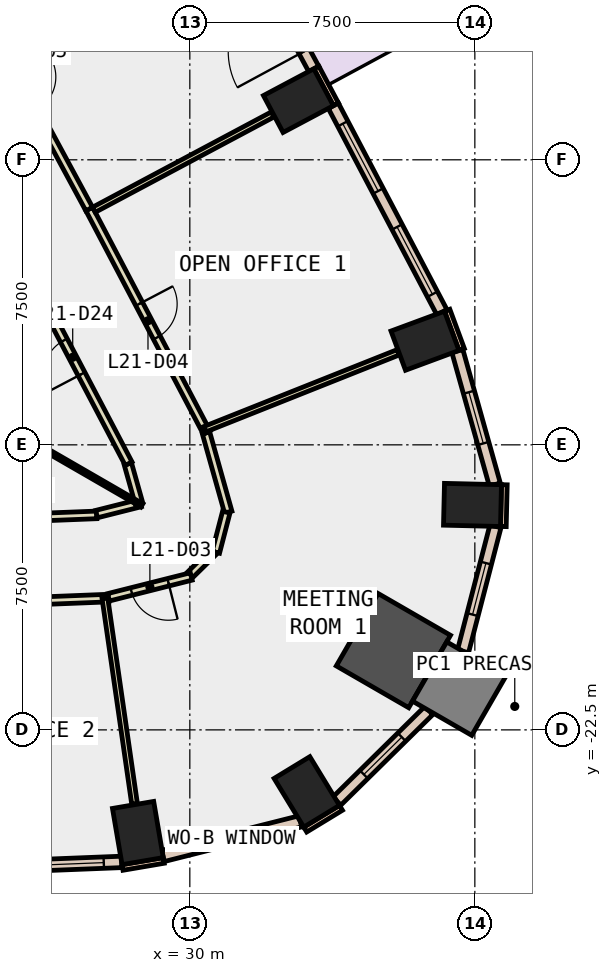
"""IFC4 building model, lengths in metres.
Left out: names, types, materials, properties, quantities, classifications, styles, units other than length and angle.
Written with IfcOpenShell. Run it as: python <this file> out.ifc"""

import sys

from ifc_helpers import new_model, si_unit, direction, frame, frame_2d, origin, origin_2d, place, context, subcontext, project, spatial, rectangle, extrude, element, fill, save


model = new_model("IFC4")
c1 = context("Model", 3, precision=1e-05, world=origin(), true_north=direction((0.0, 1.0)))
c2 = subcontext(c1, "Body", "Model", "MODEL_VIEW")
j1 = project(units=[si_unit("LENGTHUNIT", "METRE"), si_unit("PLANEANGLEUNIT", "RADIAN")], contexts=[c1])
p1 = place(None, origin())
s1 = spatial("IfcSite", under=j1, at=p1, CompositionType="ELEMENT")
p2 = place(p1, origin())
s2 = spatial("IfcBuilding", under=s1, at=p2, CompositionType="ELEMENT")
p3 = place(p2, frame((0.0, 0.0, 99.2)))
s3 = spatial("IfcBuildingStorey", under=s2, at=p3, CompositionType="ELEMENT", Elevation=99.2)
for number, where, z_axis, x_axis in (
    (1, (28.633, -25.214, -0.4), (0.0, 0.0, 1.0), (0.986, 0.168, 0.0)),
    (2, (33.078, -24.132, -0.4), (0.0, 0.0, 1.0), (0.854, 0.52, 0.0)),
):
    element("IfcColumn", number, at=place(p3, frame(where, z_axis=z_axis, x_axis=x_axis)), inside=s3, PredefinedType="COLUMN", context=c2, shape_type="SweptSolid", body=[
        extrude(rectangle(XDim=1.1, YDim=1.5, at=origin_2d()), origin(), (0.0, 0.0, 1.0), 4.2),
    ])
p4 = place(p3, frame((35.357, -20.414, -0.4), z_axis=(0.0, 0.0, 1.0), x_axis=(-0.866025403784, 0.5, 0.0)))
e3 = element("IfcColumn", 3, at=p4, inside=s3, PredefinedType="COLUMN", context=c2, shape_type="SweptSolid", body=[
    extrude(rectangle(XDim=2.2, YDim=2.2, at=origin_2d()), origin(), (0.0, 0.0, 1.0), 4.2),
])
for number, where, z_axis, x_axis in (
    (4, (37.438, -16.581, -0.4), (0.0, 0.0, 1.0), (0.023, 1.0, 0.0)),
    (5, (36.188, -12.261, -0.4), (0.0, 0.0, 1.0), (-0.347, 0.938, 0.0)),
    (6, (32.858, -5.943, -0.4), (0.0, 0.0, 1.0), (-0.469, 0.883, 0.0)),
):
    element("IfcColumn", number, at=place(p3, frame(where, z_axis=z_axis, x_axis=x_axis)), inside=s3, PredefinedType="COLUMN", context=c2, shape_type="SweptSolid", body=[
        extrude(rectangle(XDim=1.1, YDim=1.5, at=origin_2d()), origin(), (0.0, 0.0, 1.0), 4.2),
    ])
p5 = place(p3, frame((37.089, -21.414, -0.4), z_axis=(0.0, 0.0, 1.0), x_axis=(-0.866025403784, 0.5, 0.0)))
e7 = element("IfcColumn", 7, at=p5, inside=s3, PredefinedType="COLUMN", context=c2, shape_type="SweptSolid", body=[
    extrude(rectangle(XDim=1.8, YDim=1.8, at=origin_2d()), origin(), (0.0, 0.0, 1.0), 4.2),
])
p6 = place(p3, frame((37.153, -12.49, 0.0), z_axis=(0.0, 0.0, 1.0), x_axis=(-0.347205967468, 0.937788897436, 0.0)))
e8 = element("IfcWall", 8, at=p6, inside=s3, PredefinedType="STANDARD", context=c2, shape_type="SweptSolid", body=[
    extrude(rectangle(XDim=1.1, YDim=0.15, at=frame_2d((0.55, 0.0))), origin(), (0.0, 0.0, 1.0), 3.8),
])
p7 = place(p3, frame((33.845, -6.042, 0.0), z_axis=(0.0, 0.0, 1.0), x_axis=(-0.46919310775, 0.883095593716, 0.0)))
e9 = element("IfcWall", 9, at=p7, inside=s3, PredefinedType="STANDARD", context=c2, shape_type="SweptSolid", body=[
    extrude(rectangle(XDim=1.099, YDim=0.15, at=frame_2d((0.55, 0.0))), origin(), (0.0, 0.0, 1.0), 3.8),
])
p8 = place(p3, frame((28.229, -26.12, 0.0), z_axis=(0.0, 0.0, 1.0), x_axis=(0.985763338892, 0.168138751323, 0.0)))
e10 = element("IfcWall", 10, at=p8, inside=s3, PredefinedType="STANDARD", context=c2, shape_type="SweptSolid", body=[
    extrude(rectangle(XDim=1.101, YDim=0.15, at=frame_2d((0.55, 0.0))), origin(), (0.0, 0.0, 1.0), 3.8),
])
p9 = place(p3, frame((33.037, -25.123, 0.0), z_axis=(0.0, 0.0, 1.0), x_axis=(0.854245682901, 0.519869515594, 0.0)))
e11 = element("IfcWall", 11, at=p9, inside=s3, PredefinedType="STANDARD", context=c2, shape_type="SweptSolid", body=[
    extrude(rectangle(XDim=1.1, YDim=0.15, at=frame_2d((0.55, 0.0))), origin(), (0.0, 0.0, 1.0), 3.8),
])
p10 = place(p3, frame((38.25, -17.15, 0.0), z_axis=(0.0, 0.0, 1.0), x_axis=(0.023522901136, 0.999723298279, 0.0)))
e12 = element("IfcWall", 12, at=p10, inside=s3, PredefinedType="STANDARD", context=c2, shape_type="SweptSolid", body=[
    extrude(rectangle(XDim=1.1, YDim=0.15, at=frame_2d((0.55, 0.0))), origin(), (0.0, 0.0, 1.0), 3.8),
])
p11 = place(p3, frame((22.332, -26.206, 0.0), z_axis=(0.0, 0.0, 1.0), x_axis=(0.99922113396, 0.039460428885, 0.0)))
e13 = element("IfcWall", 13, at=p11, inside=s3, PredefinedType="STANDARD", context=c2, shape_type="SweptSolid", body=[
    extrude(rectangle(XDim=5.878, YDim=0.3, at=frame_2d((2.939, 0.0))), origin(), (0.0, 0.0, 1.0), 3.8),
])
p12 = place(p11, frame((0.469, 0.0, 0.9)))
e14 = element("IfcOpeningElement", 14, at=p12, cuts=e13, PredefinedType="OPENING", context=c2, shape_type="SweptSolid", body=[
    extrude(rectangle(XDim=2.0, YDim=2.6, at=frame_2d((1.0, 1.3))), frame((0.0, 0.16, 0.0), z_axis=(0.0, -1.0, 0.0), x_axis=(1.0, 0.0, 0.0)), (0.0, 0.0, 1.0), 0.32),
])
p13 = place(p11, frame((3.408, 0.0, 0.9)))
e15 = element("IfcOpeningElement", 15, at=p13, cuts=e13, PredefinedType="OPENING", context=c2, shape_type="SweptSolid", body=[
    extrude(rectangle(XDim=2.0, YDim=2.6, at=frame_2d((1.0, 1.3))), frame((0.0, 0.16, 0.0), z_axis=(0.0, -1.0, 0.0), x_axis=(1.0, 0.0, 0.0)), (0.0, 0.0, 1.0), 0.32),
])
p14 = place(p3, frame((29.293, -25.818, 0.0), z_axis=(0.0, 0.0, 1.0), x_axis=(0.969658938481, 0.244461741432, 0.0)))
e16 = element("IfcWall", 16, at=p14, inside=s3, PredefinedType="STANDARD", context=c2, shape_type="SweptSolid", body=[
    extrude(rectangle(XDim=3.727, YDim=0.3, at=frame_2d((1.864, 0.0))), origin(), (0.0, 0.0, 1.0), 3.8),
])
p15 = place(p14, frame((1.164, 0.0, 0.9)))
e17 = element("IfcOpeningElement", 17, at=p15, cuts=e16, PredefinedType="OPENING", context=c2, shape_type="SweptSolid", body=[
    extrude(rectangle(XDim=1.4, YDim=2.6, at=frame_2d((0.7, 1.3))), frame((0.0, 0.16, 0.0), z_axis=(0.0, -1.0, 0.0), x_axis=(1.0, 0.0, 0.0)), (0.0, 0.0, 1.0), 0.32),
])
p16 = place(p3, frame((33.868, -24.374, 0.0), z_axis=(0.0, 0.0, 1.0), x_axis=(0.712546371703, 0.701625019631, 0.0)))
e18 = element("IfcWall", 18, at=p16, inside=s3, PredefinedType="STANDARD", context=c2, shape_type="SweptSolid", body=[
    extrude(rectangle(XDim=3.398, YDim=0.3, at=frame_2d((1.699, 0.0))), origin(), (0.0, 0.0, 1.0), 3.8),
])
p17 = place(p16, frame((0.999, 0.0, 0.9)))
e19 = element("IfcOpeningElement", 19, at=p17, cuts=e18, PredefinedType="OPENING", context=c2, shape_type="SweptSolid", body=[
    extrude(rectangle(XDim=1.4, YDim=2.6, at=frame_2d((0.7, 1.3))), frame((0.0, 0.16, 0.0), z_axis=(0.0, -1.0, 0.0), x_axis=(1.0, 0.0, 0.0)), (0.0, 0.0, 1.0), 0.32),
])
p18 = place(p3, frame((37.189, -20.433, 0.0), z_axis=(0.0, 0.0, 1.0), x_axis=(0.251046938153, 0.967974914367, 0.0)))
e20 = element("IfcWall", 20, at=p18, inside=s3, PredefinedType="STANDARD", context=c2, shape_type="SweptSolid", body=[
    extrude(rectangle(XDim=3.398, YDim=0.3, at=frame_2d((1.699, 0.0))), origin(), (0.0, 0.0, 1.0), 3.8),
])
p19 = place(p18, frame((0.999, 0.0, 0.9)))
e21 = element("IfcOpeningElement", 21, at=p19, cuts=e20, PredefinedType="OPENING", context=c2, shape_type="SweptSolid", body=[
    extrude(rectangle(XDim=1.4, YDim=2.6, at=frame_2d((0.7, 1.3))), frame((0.0, 0.16, 0.0), z_axis=(0.0, -1.0, 0.0), x_axis=(1.0, 0.0, 0.0)), (0.0, 0.0, 1.0), 0.32),
])
p20 = place(p3, frame((38.026, -16.046, 0.0), z_axis=(0.0, 0.0, 1.0), x_axis=(-0.270054089595, 0.96284515302, 0.0)))
e22 = element("IfcWall", 22, at=p20, inside=s3, PredefinedType="STANDARD", context=c2, shape_type="SweptSolid", body=[
    extrude(rectangle(XDim=3.651, YDim=0.3, at=frame_2d((1.825, 0.0))), origin(), (0.0, 0.0, 1.0), 3.8),
])
p21 = place(p20, frame((1.125, 0.0, 0.9)))
e23 = element("IfcOpeningElement", 23, at=p21, cuts=e22, PredefinedType="OPENING", context=c2, shape_type="SweptSolid", body=[
    extrude(rectangle(XDim=1.4, YDim=2.6, at=frame_2d((0.7, 1.3))), frame((0.0, 0.16, 0.0), z_axis=(0.0, -1.0, 0.0), x_axis=(1.0, 0.0, 0.0)), (0.0, 0.0, 1.0), 0.32),
])
p22 = place(p3, frame((36.633, -11.511, 0.0), z_axis=(0.0, 0.0, 1.0), x_axis=(-0.465380908665, 0.88511050714, 0.0)))
e24 = element("IfcWall", 24, at=p22, inside=s3, PredefinedType="STANDARD", context=c2, shape_type="SweptSolid", body=[
    extrude(rectangle(XDim=6.139, YDim=0.3, at=frame_2d((3.07, 0.0))), origin(), (0.0, 0.0, 1.0), 3.8),
])
p23 = place(p22, frame((0.535, 0.0, 0.9)))
e25 = element("IfcOpeningElement", 25, at=p23, cuts=e24, PredefinedType="OPENING", context=c2, shape_type="SweptSolid", body=[
    extrude(rectangle(XDim=2.0, YDim=2.6, at=frame_2d((1.0, 1.3))), frame((0.0, 0.16, 0.0), z_axis=(0.0, -1.0, 0.0), x_axis=(1.0, 0.0, 0.0)), (0.0, 0.0, 1.0), 0.32),
])
p24 = place(p22, frame((3.604, 0.0, 0.9)))
e26 = element("IfcOpeningElement", 26, at=p24, cuts=e24, PredefinedType="OPENING", context=c2, shape_type="SweptSolid", body=[
    extrude(rectangle(XDim=2.0, YDim=2.6, at=frame_2d((1.0, 1.3))), frame((0.0, 0.16, 0.0), z_axis=(0.0, -1.0, 0.0), x_axis=(1.0, 0.0, 0.0)), (0.0, 0.0, 1.0), 0.32),
])
p25 = place(p3, frame((33.26, -5.108, 0.0), z_axis=(0.0, 0.0, 1.0), x_axis=(-0.475573079782, 0.879676216449, 0.0)))
e27 = element("IfcWall", 27, at=p25, inside=s3, PredefinedType="STANDARD", context=c2, shape_type="SweptSolid", body=[
    extrude(rectangle(XDim=6.104, YDim=0.3, at=frame_2d((3.052, 0.0))), origin(), (0.0, 0.0, 1.0), 3.8),
])
p26 = place(p25, frame((0.526, 0.0, 0.0)))
e28 = element("IfcOpeningElement", 28, at=p26, cuts=e27, PredefinedType="OPENING", context=c2, shape_type="SweptSolid", body=[
    extrude(rectangle(XDim=2.0, YDim=2.4, at=frame_2d((1.0, 1.2))), frame((0.0, 0.16, 0.0), z_axis=(0.0, -1.0, 0.0), x_axis=(1.0, 0.0, 0.0)), (0.0, 0.0, 1.0), 0.32),
])
p27 = place(p25, frame((3.578, 0.0, 0.9)))
e29 = element("IfcOpeningElement", 29, at=p27, cuts=e27, PredefinedType="OPENING", context=c2, shape_type="SweptSolid", body=[
    extrude(rectangle(XDim=2.0, YDim=2.6, at=frame_2d((1.0, 1.3))), frame((0.0, 0.16, 0.0), z_axis=(0.0, -1.0, 0.0), x_axis=(1.0, 0.0, 0.0)), (0.0, 0.0, 1.0), 0.32),
])
p28 = place(p3, frame((21.471, -17.083, 0.0), z_axis=(0.0, 0.0, 1.0), x_axis=(0.999221407079, 0.039453512338, 0.0)))
e30 = element("IfcWall", 30, at=p28, inside=s3, PredefinedType="PARTITIONING", context=c2, shape_type="SweptSolid", body=[
    extrude(rectangle(XDim=6.083, YDim=0.2, at=frame_2d((3.042, 0.0))), origin(), (0.0, 0.0, 1.0), 3.8),
])
p29 = place(p28, frame((2.541, 0.0, 0.0)))
e31 = element("IfcOpeningElement", 31, at=p29, cuts=e30, PredefinedType="OPENING", context=c2, shape_type="SweptSolid", body=[
    extrude(rectangle(XDim=1.0, YDim=2.1, at=frame_2d((0.5, 1.05))), frame((0.0, 0.11, 0.0), z_axis=(0.0, -1.0, 0.0), x_axis=(1.0, 0.0, 0.0)), (0.0, 0.0, 1.0), 0.22),
])
p30 = place(p3, frame((27.546, -16.822, 0.0), z_axis=(0.0, 0.0, 1.0), x_axis=(0.969694756333, 0.244319625777, 0.0)))
e32 = element("IfcWall", 32, at=p30, inside=s3, PredefinedType="PARTITIONING", context=c2, shape_type="SweptSolid", body=[
    extrude(rectangle(XDim=1.191, YDim=0.2, at=frame_2d((0.596, 0.0))), origin(), (0.0, 0.0, 1.0), 3.8),
])
p31 = place(p3, frame((28.662, -16.541, 0.0), z_axis=(0.0, 0.0, 1.0), x_axis=(-0.270771802087, 0.96264356394, 0.0)))
e33 = element("IfcWall", 33, at=p31, inside=s3, PredefinedType="PARTITIONING", context=c2, shape_type="SweptSolid", body=[
    extrude(rectangle(XDim=1.078, YDim=0.2, at=frame_2d((0.539, 0.0))), origin(), (0.0, 0.0, 1.0), 3.8),
])
p32 = place(p3, frame((28.39, -15.495, 0.0), z_axis=(0.0, 0.0, 1.0), x_axis=(-0.465367816287, 0.885117390838, 0.0)))
e34 = element("IfcWall", 34, at=p32, inside=s3, PredefinedType="PARTITIONING", context=c2, shape_type="SweptSolid", body=[
    extrude(rectangle(XDim=6.326, YDim=0.2, at=frame_2d((3.163, 0.0))), origin(), (0.0, 0.0, 1.0), 3.8),
])
p33 = place(p32, frame((2.663, 0.0, 0.0)))
e35 = element("IfcOpeningElement", 35, at=p33, cuts=e34, PredefinedType="OPENING", context=c2, shape_type="SweptSolid", body=[
    extrude(rectangle(XDim=1.0, YDim=2.1, at=frame_2d((0.5, 1.05))), frame((0.0, 0.11, 0.0), z_axis=(0.0, -1.0, 0.0), x_axis=(1.0, 0.0, 0.0)), (0.0, 0.0, 1.0), 0.22),
])
p34 = place(p3, frame((27.865, -19.032, 0.0), z_axis=(0.0, 0.0, 1.0), x_axis=(-0.999218029978, -0.039538950003, 0.0)))
e36 = element("IfcWall", 36, at=p34, inside=s3, PredefinedType="PARTITIONING", context=c2, shape_type="SweptSolid", body=[
    extrude(rectangle(XDim=6.249, YDim=0.2, at=frame_2d((3.125, 0.0))), origin(), (0.0, 0.0, 1.0), 3.8),
])
p35 = place(p34, frame((2.699, 0.0, 0.0)))
e37 = element("IfcOpeningElement", 37, at=p35, cuts=e36, PredefinedType="OPENING", context=c2, shape_type="SweptSolid", body=[
    extrude(rectangle(XDim=1.0, YDim=2.1, at=frame_2d((0.5, 1.05))), frame((0.0, 0.11, 0.0), z_axis=(0.0, -1.0, 0.0), x_axis=(1.0, 0.0, 0.0)), (0.0, 0.0, 1.0), 0.22),
])
p36 = place(p3, frame((30.426, -14.685, 0.0), z_axis=(0.0, 0.0, 1.0), x_axis=(0.270131711391, -0.962823378664, 0.0)))
e38 = element("IfcWall", 38, at=p36, inside=s3, PredefinedType="PARTITIONING", context=c2, shape_type="SweptSolid", body=[
    extrude(rectangle(XDim=2.166, YDim=0.2, at=frame_2d((1.083, 0.0))), origin(), (0.0, 0.0, 1.0), 3.8),
])
p37 = place(p3, frame((30.959, -16.771, 0.0), z_axis=(0.0, 0.0, 1.0), x_axis=(-0.251109729392, -0.967958627114, 0.0)))
e39 = element("IfcWall", 39, at=p37, inside=s3, PredefinedType="PARTITIONING", context=c2, shape_type="SweptSolid", body=[
    extrude(rectangle(XDim=1.091, YDim=0.2, at=frame_2d((0.545, 0.0))), origin(), (0.0, 0.0, 1.0), 3.8),
])
p38 = place(p3, frame((30.639, -17.801, 0.0), z_axis=(0.0, 0.0, 1.0), x_axis=(-0.713329122722, -0.700829196507, 0.0)))
e40 = element("IfcWall", 40, at=p38, inside=s3, PredefinedType="PARTITIONING", context=c2, shape_type="SweptSolid", body=[
    extrude(rectangle(XDim=0.879, YDim=0.2, at=frame_2d((0.439, 0.0))), origin(), (0.0, 0.0, 1.0), 3.8),
])
p39 = place(p3, frame((30.037, -18.463, 0.0), z_axis=(0.0, 0.0, 1.0), x_axis=(-0.969686214682, -0.244353524746, 0.0)))
e41 = element("IfcWall", 41, at=p39, inside=s3, PredefinedType="PARTITIONING", context=c2, shape_type="SweptSolid", body=[
    extrude(rectangle(XDim=2.243, YDim=0.2, at=frame_2d((1.122, 0.0))), origin(), (0.0, 0.0, 1.0), 3.8),
])
p40 = place(p39, frame((0.622, 0.0, 0.0)))
e42 = element("IfcOpeningElement", 42, at=p40, cuts=e41, PredefinedType="OPENING", context=c2, shape_type="SweptSolid", body=[
    extrude(rectangle(XDim=1.0, YDim=2.1, at=frame_2d((0.5, 1.05))), frame((0.0, 0.11, 0.0), z_axis=(0.0, -1.0, 0.0), x_axis=(1.0, 0.0, 0.0)), (0.0, 0.0, 1.0), 0.22),
])
p41 = place(p3, frame((27.353, -8.794, 0.0), z_axis=(0.0, 0.0, 1.0), x_axis=(0.465239168813, -0.885185017836, 0.0)))
e43 = element("IfcWall", 43, at=p41, inside=s3, PredefinedType="PARTITIONING", context=c2, shape_type="SweptSolid", body=[
    extrude(rectangle(XDim=6.646, YDim=0.2, at=frame_2d((3.323, 0.0))), origin(), (0.0, 0.0, 1.0), 3.8),
])
p42 = place(p41, frame((2.823, 0.0, 0.0)))
e44 = element("IfcOpeningElement", 44, at=p42, cuts=e43, PredefinedType="OPENING", context=c2, shape_type="SweptSolid", body=[
    extrude(rectangle(XDim=1.0, YDim=2.1, at=frame_2d((0.5, 1.05))), frame((0.0, 0.11, 0.0), z_axis=(0.0, -1.0, 0.0), x_axis=(1.0, 0.0, 0.0)), (0.0, 0.0, 1.0), 0.22),
])
p43 = place(p3, frame((24.0, -2.593, 0.0), z_axis=(0.0, 0.0, 1.0), x_axis=(0.475480817472, -0.879726089312, 0.0)))
e45 = element("IfcWall", 45, at=p43, inside=s3, PredefinedType="PARTITIONING", context=c2, shape_type="SweptSolid", body=[
    extrude(rectangle(XDim=7.05, YDim=0.2, at=frame_2d((3.525, 0.0))), origin(), (0.0, 0.0, 1.0), 3.8),
])
p44 = place(p43, frame((3.1, 0.0, 0.0)))
e46 = element("IfcOpeningElement", 46, at=p44, cuts=e45, PredefinedType="OPENING", context=c2, shape_type="SweptSolid", body=[
    extrude(rectangle(XDim=1.0, YDim=2.1, at=frame_2d((0.5, 1.05))), frame((0.0, 0.11, 0.0), z_axis=(0.0, -1.0, 0.0), x_axis=(1.0, 0.0, 0.0)), (0.0, 0.0, 1.0), 0.22),
])
p45 = place(p3, frame((21.196, -12.238, 0.0), z_axis=(0.0, 0.0, 1.0), x_axis=(0.866023145199, -0.500003911965, 0.0)))
e47 = element("IfcWall", 47, at=p45, inside=s3, PredefinedType="PARTITIONING", context=c2, shape_type="SweptSolid", body=[
    extrude(rectangle(XDim=8.71, YDim=0.1, at=frame_2d((4.355, 0.0))), origin(), (0.0, 0.0, 1.0), 3.8),
])
p46 = place(p3, frame((27.765, -19.036, 0.0), z_axis=(0.0, 0.0, 1.0), x_axis=(0.142827612329, -0.989747580526, 0.0)))
e48 = element("IfcWall", 48, at=p46, inside=s3, PredefinedType="PARTITIONING", context=c2, shape_type="SweptSolid", body=[
    extrude(rectangle(XDim=5.468, YDim=0.15, at=frame_2d((2.734, 0.0))), origin(), (0.0, 0.0, 1.0), 3.8),
])
p47 = place(p3, frame((30.399, -14.588, 0.0), z_axis=(0.0, 0.0, 1.0), x_axis=(0.92913411584, 0.36974287658, 0.0)))
e49 = element("IfcWall", 49, at=p47, inside=s3, PredefinedType="PARTITIONING", context=c2, shape_type="SweptSolid", body=[
    extrude(rectangle(XDim=5.469, YDim=0.15, at=frame_2d((2.734, 0.0))), origin(), (0.0, 0.0, 1.0), 3.8),
])
p48 = place(p3, frame((27.476, -8.814, 0.0), z_axis=(0.0, 0.0, 1.0), x_axis=(0.882440424847, 0.47042416668, 0.0)))
e50 = element("IfcWall", 50, at=p48, inside=s3, PredefinedType="PARTITIONING", context=c2, shape_type="SweptSolid", body=[
    extrude(rectangle(XDim=5.329, YDim=0.15, at=frame_2d((2.665, 0.0))), origin(), (0.0, 0.0, 1.0), 3.8),
])
p49 = place(p13, origin())
e51 = element("IfcWindow", 51, at=p49, inside=s3, PartitioningType="SINGLE_PANEL", PredefinedType="WINDOW", context=c2, shape_type="SweptSolid", body=[
    extrude(rectangle(XDim=2.0, YDim=2.6, at=frame_2d((1.0, 1.3))), frame((0.0, 0.03, 0.0), z_axis=(0.0, -1.0, 0.0), x_axis=(1.0, 0.0, 0.0)), (0.0, 0.0, 1.0), 0.06),
])
fill(e15, e51)
p50 = place(p15, origin())
e52 = element("IfcWindow", 52, at=p50, inside=s3, PartitioningType="SINGLE_PANEL", PredefinedType="WINDOW", context=c2, shape_type="SweptSolid", body=[
    extrude(rectangle(XDim=1.4, YDim=2.6, at=frame_2d((0.7, 1.3))), frame((0.0, 0.03, 0.0), z_axis=(0.0, -1.0, 0.0), x_axis=(1.0, 0.0, 0.0)), (0.0, 0.0, 1.0), 0.06),
])
fill(e17, e52)
p51 = place(p17, origin())
e53 = element("IfcWindow", 53, at=p51, inside=s3, PartitioningType="SINGLE_PANEL", PredefinedType="WINDOW", context=c2, shape_type="SweptSolid", body=[
    extrude(rectangle(XDim=1.4, YDim=2.6, at=frame_2d((0.7, 1.3))), frame((0.0, 0.03, 0.0), z_axis=(0.0, -1.0, 0.0), x_axis=(1.0, 0.0, 0.0)), (0.0, 0.0, 1.0), 0.06),
])
fill(e19, e53)
p52 = place(p19, origin())
e54 = element("IfcWindow", 54, at=p52, inside=s3, PartitioningType="SINGLE_PANEL", PredefinedType="WINDOW", context=c2, shape_type="SweptSolid", body=[
    extrude(rectangle(XDim=1.4, YDim=2.6, at=frame_2d((0.7, 1.3))), frame((0.0, 0.03, 0.0), z_axis=(0.0, -1.0, 0.0), x_axis=(1.0, 0.0, 0.0)), (0.0, 0.0, 1.0), 0.06),
])
fill(e21, e54)
p53 = place(p21, origin())
e55 = element("IfcWindow", 55, at=p53, inside=s3, PartitioningType="SINGLE_PANEL", PredefinedType="WINDOW", context=c2, shape_type="SweptSolid", body=[
    extrude(rectangle(XDim=1.4, YDim=2.6, at=frame_2d((0.7, 1.3))), frame((0.0, 0.03, 0.0), z_axis=(0.0, -1.0, 0.0), x_axis=(1.0, 0.0, 0.0)), (0.0, 0.0, 1.0), 0.06),
])
fill(e23, e55)
p54 = place(p23, origin())
e56 = element("IfcWindow", 56, at=p54, inside=s3, PartitioningType="SINGLE_PANEL", PredefinedType="WINDOW", context=c2, shape_type="SweptSolid", body=[
    extrude(rectangle(XDim=2.0, YDim=2.6, at=frame_2d((1.0, 1.3))), frame((0.0, 0.03, 0.0), z_axis=(0.0, -1.0, 0.0), x_axis=(1.0, 0.0, 0.0)), (0.0, 0.0, 1.0), 0.06),
])
fill(e25, e56)
p55 = place(p24, origin())
e57 = element("IfcWindow", 57, at=p55, inside=s3, PartitioningType="SINGLE_PANEL", PredefinedType="WINDOW", context=c2, shape_type="SweptSolid", body=[
    extrude(rectangle(XDim=2.0, YDim=2.6, at=frame_2d((1.0, 1.3))), frame((0.0, 0.03, 0.0), z_axis=(0.0, -1.0, 0.0), x_axis=(1.0, 0.0, 0.0)), (0.0, 0.0, 1.0), 0.06),
])
fill(e26, e57)
p56 = place(p40, origin())
e58 = element("IfcDoor", 58, at=p56, inside=s3, OperationType="SINGLE_SWING_LEFT", PredefinedType="DOOR", context=c2, shape_type="SweptSolid", body=[
    extrude(rectangle(XDim=1.0, YDim=2.1, at=frame_2d((0.5, 1.05))), frame((0.0, 0.025, 0.0), z_axis=(0.0, -1.0, 0.0), x_axis=(1.0, 0.0, 0.0)), (0.0, 0.0, 1.0), 0.05),
])
fill(e42, e58)
p57 = place(p42, origin())
e59 = element("IfcDoor", 59, at=p57, inside=s3, OperationType="SINGLE_SWING_LEFT", PredefinedType="DOOR", context=c2, shape_type="SweptSolid", body=[
    extrude(rectangle(XDim=1.0, YDim=2.1, at=frame_2d((0.5, 1.05))), frame((0.0, 0.025, 0.0), z_axis=(0.0, -1.0, 0.0), x_axis=(1.0, 0.0, 0.0)), (0.0, 0.0, 1.0), 0.05),
])
fill(e44, e59)
p58 = place(p33, origin())
e60 = element("IfcDoor", 60, at=p58, inside=s3, OperationType="SINGLE_SWING_LEFT", PredefinedType="DOOR", context=c2, shape_type="SweptSolid", body=[
    extrude(rectangle(XDim=1.0, YDim=2.1, at=frame_2d((0.5, 1.05))), frame((0.0, 0.025, 0.0), z_axis=(0.0, -1.0, 0.0), x_axis=(1.0, 0.0, 0.0)), (0.0, 0.0, 1.0), 0.05),
])
fill(e35, e60)
save(model, sys.argv[1])
